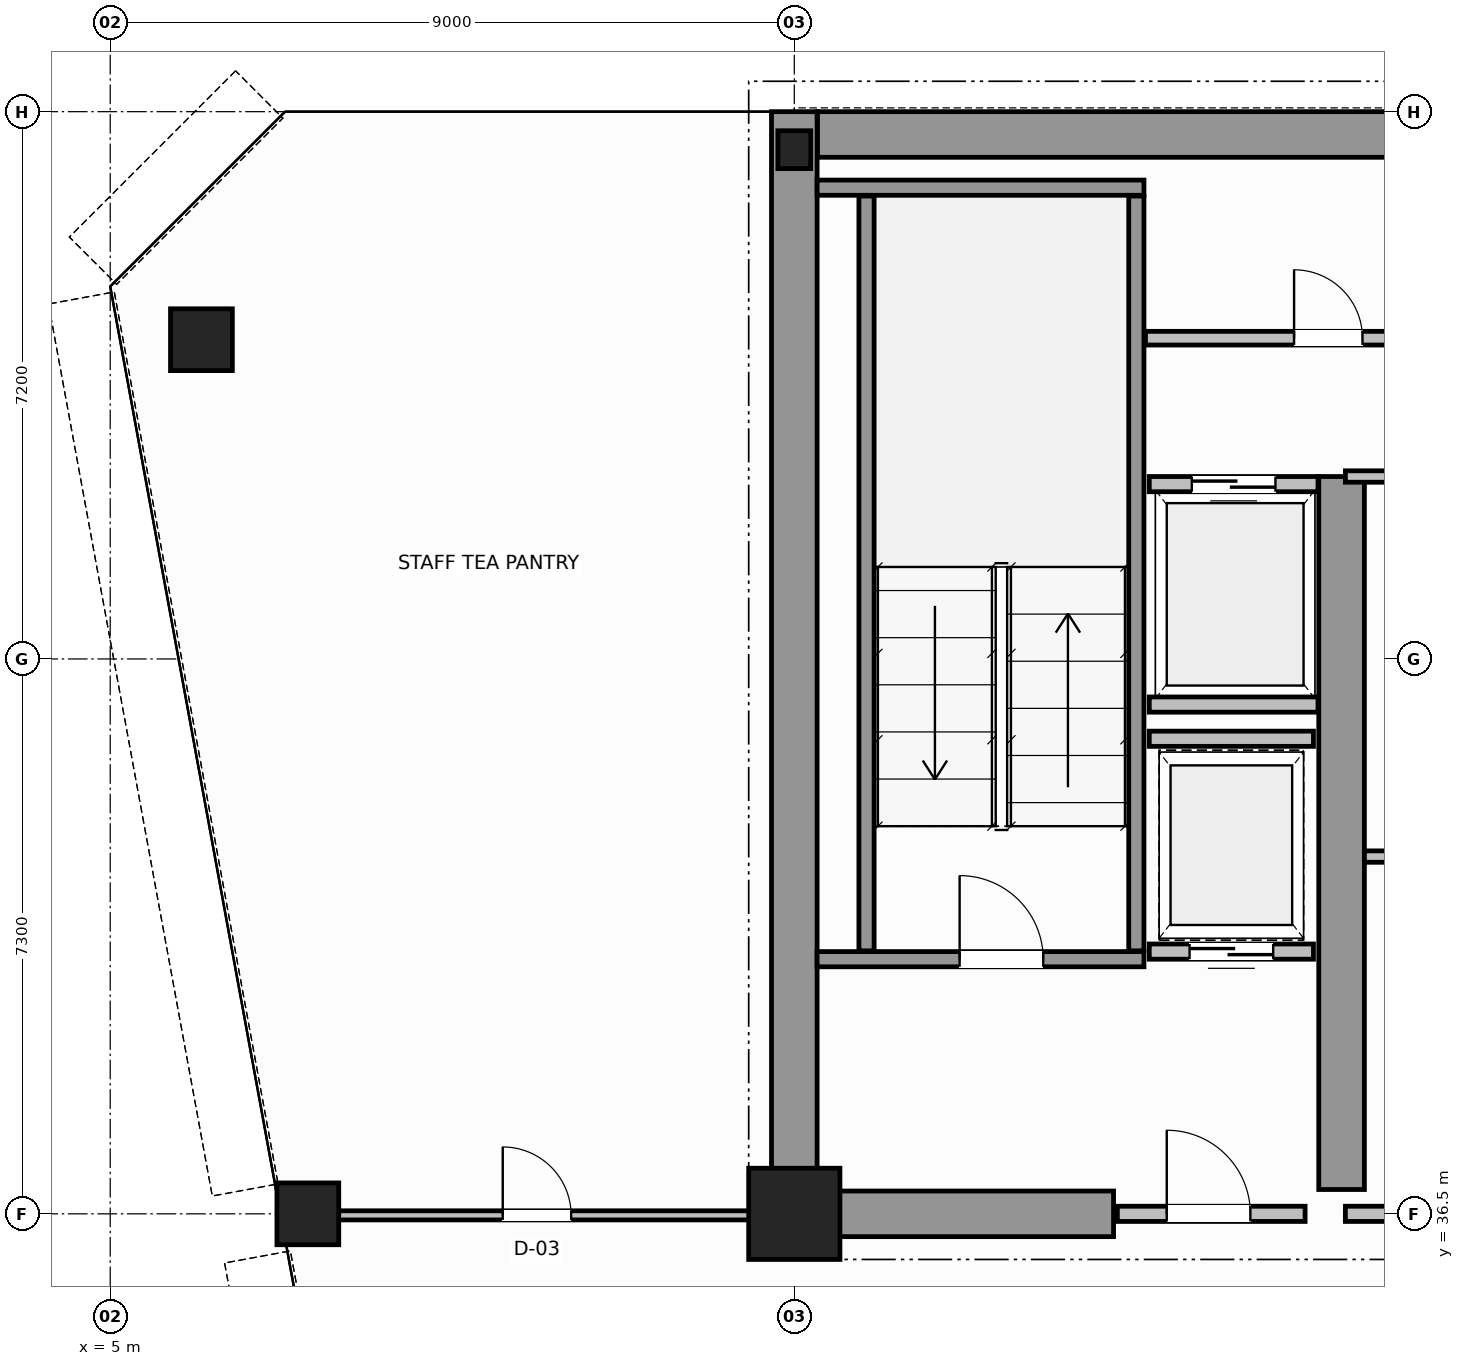
"""IFC4 building model, lengths in metres.
Left out: names, types, materials, properties, quantities, classifications, styles, units other than length and angle.
Written with IfcOpenShell. Run it as: python <this file> out.ifc"""

import sys

from ifc_helpers import new_model, si_unit, direction, frame, frame_2d, origin, origin_2d, place, context, subcontext, project, spatial, rectangle, hollow_circle, i_section, extrude, source, transform, mapped, element, fill, save


model = new_model("IFC4")
c1 = context("Model", 3, precision=1e-05, world=origin(), true_north=direction((0.0, 1.0)))
c2 = subcontext(c1, "Body", "Model", "MODEL_VIEW")
j1 = project(units=[si_unit("LENGTHUNIT", "METRE"), si_unit("PLANEANGLEUNIT", "RADIAN")], contexts=[c1])
p1 = place(None, origin())
s1 = spatial("IfcSite", under=j1, at=p1, CompositionType="ELEMENT")
p2 = place(p1, origin())
s2 = spatial("IfcBuilding", under=s1, at=p2, CompositionType="ELEMENT")
p3 = place(p2, frame((0.0, 0.0, 191.8)))
s3 = spatial("IfcBuildingStorey", under=s2, at=p3, CompositionType="ELEMENT", Elevation=191.8)
m1 = source(origin(), c2, "Body", "SweptSolid", [
    extrude(rectangle(XDim=1.2, YDim=1.2, at=origin_2d()), origin(), (0.0, 0.0, 1.0), 3.8),
])
p4 = place(p3, frame((14.0, 36.5, 0.0), z_axis=(0.0, 0.0, 1.0), x_axis=(1.0, 0.0, 0.0)))
e1 = element("IfcColumn", 1, at=p4, inside=s3, PredefinedType="COLUMN", context=c2, shape_type="MappedRepresentation", body=[
    mapped(m1, transform((0.0, 0.0, 0.0), scale=1.0)),
])
m2 = source(origin(), c2, "Body", "SweptSolid", [
    extrude(i_section(OverallWidth=0.432, OverallDepth=0.498, WebThickness=0.055, FlangeThickness=0.068, FilletRadius=0.015, at=origin_2d()), origin(), (0.0, 0.0, 1.0), 3.8),
])
p5 = place(p3, frame((14.0, 50.5, 0.0), z_axis=(0.0, 0.0, 1.0), x_axis=(1.0, 0.0, 0.0)))
e2 = element("IfcColumn", 2, at=p5, inside=s3, PredefinedType="COLUMN", context=c2, shape_type="MappedRepresentation", body=[
    mapped(m2, transform((0.0, 0.0, 0.0), scale=1.0)),
])
m3 = source(origin(), c2, "Body", "SweptSolid", [
    extrude(hollow_circle(Radius=0.406, WallThickness=0.04, at=origin_2d()), origin(), (0.0, 0.0, 1.0), 3.8),
])
for number, where, z_axis, x_axis in (
    (3, (6.2, 48.0, 0.0), (0.0, 0.0, 1.0), (1.0, 0.0, 0.0)),
    (4, (7.6, 36.5, 0.0), (0.0, 0.0, 1.0), (1.0, 0.0, 0.0)),
):
    element("IfcColumn", number, at=place(p3, frame(where, z_axis=z_axis, x_axis=x_axis)), inside=s3, PredefinedType="COLUMN", context=c2, shape_type="MappedRepresentation", body=[
        mapped(m3, transform((0.0, 0.0, 0.0), scale=1.0)),
    ])
p6 = place(p3, frame((14.304, 50.7, 0.0), z_axis=(0.0, 0.0, 1.0), x_axis=(1.0, 0.0, 0.0)))
e5 = element("IfcWall", 5, at=p6, inside=s3, PredefinedType="SHEAR", context=c2, shape_type="SweptSolid", body=[
    extrude(rectangle(XDim=19.694, YDim=0.6, at=frame_2d((9.847, 0.0))), origin(), (0.0, 0.0, 1.0), 3.8),
])
p7 = place(p3, frame((14.0, 36.5, 0.0), z_axis=(0.0, 0.0, 1.0), x_axis=(0.0, 1.0, 0.0)))
e6 = element("IfcWall", 6, at=p7, inside=s3, PredefinedType="SHEAR", context=c2, shape_type="SweptSolid", body=[
    extrude(rectangle(XDim=14.5, YDim=0.6, at=frame_2d((7.25, 0.0))), origin(), (0.0, 0.0, 1.0), 3.8),
])
p8 = place(p3, frame((14.32, 36.5, 0.0), z_axis=(0.0, 0.0, 1.0), x_axis=(1.0, 0.0, 0.0)))
e7 = element("IfcWall", 7, at=p8, inside=s3, PredefinedType="SHEAR", context=c2, shape_type="SweptSolid", body=[
    extrude(rectangle(XDim=3.88, YDim=0.6, at=frame_2d((1.94, 0.0))), origin(), (0.0, 0.0, 1.0), 2.58),
])
p9 = place(p3, frame((21.2, 36.82, 0.0), z_axis=(0.0, 0.0, 1.0), x_axis=(0.0, 1.0, 0.0)))
e8 = element("IfcWall", 8, at=p9, inside=s3, PredefinedType="SHEAR", context=c2, shape_type="SweptSolid", body=[
    extrude(rectangle(XDim=9.38, YDim=0.6, at=frame_2d((4.69, 0.0))), origin(), (0.0, 0.0, 1.0), 3.8),
])
p10 = place(p3, frame((14.3, 39.85, 0.0), z_axis=(0.0, 0.0, 1.0), x_axis=(1.0, 0.0, 0.0)))
e9 = element("IfcWall", 9, at=p10, inside=s3, PredefinedType="SOLIDWALL", context=c2, shape_type="SweptSolid", body=[
    extrude(rectangle(XDim=4.3, YDim=0.2, at=frame_2d((2.15, 0.0))), origin(), (0.0, 0.0, 1.0), 3.8),
])
p11 = place(p10, frame((1.875, 0.0, 0.0)))
e10 = element("IfcOpeningElement", 10, at=p11, cuts=e9, PredefinedType="OPENING", context=c2, shape_type="SweptSolid", body=[
    extrude(rectangle(XDim=1.1, YDim=2.15, at=frame_2d((0.55, 1.075))), frame((0.0, 0.11, 0.0), z_axis=(0.0, -1.0, 0.0), x_axis=(1.0, 0.0, 0.0)), (0.0, 0.0, 1.0), 0.22),
])
p12 = place(p3, frame((14.3, 50.0, 0.0), z_axis=(0.0, 0.0, 1.0), x_axis=(1.0, 0.0, 0.0)))
e11 = element("IfcWall", 11, at=p12, inside=s3, PredefinedType="SOLIDWALL", context=c2, shape_type="SweptSolid", body=[
    extrude(rectangle(XDim=4.3, YDim=0.2, at=frame_2d((2.15, 0.0))), origin(), (0.0, 0.0, 1.0), 3.8),
])
for number, where, z_axis, x_axis in (
    (12, (14.95, 39.96, 0.0), (0.0, 0.0, 1.0), (0.0, 1.0, 0.0)),
    (13, (18.5, 39.96, 0.0), (0.0, 0.0, 1.0), (0.0, 1.0, 0.0)),
):
    element("IfcWall", number, at=place(p3, frame(where, z_axis=z_axis, x_axis=x_axis)), inside=s3, PredefinedType="SOLIDWALL", context=c2, shape_type="SweptSolid", body=[
        extrude(rectangle(XDim=9.93, YDim=0.2, at=frame_2d((4.965, 0.0))), origin(), (0.0, 0.0, 1.0), 3.8),
    ])
p13 = place(p3, frame((18.25, 36.5, 0.0), z_axis=(0.0, 0.0, 1.0), x_axis=(1.0, 0.0, 0.0)))
e14 = element("IfcWall", 14, at=p13, inside=s3, PredefinedType="SOLIDWALL", context=c2, shape_type="SweptSolid", body=[
    extrude(rectangle(XDim=2.47, YDim=0.2, at=frame_2d((1.235, 0.0))), origin(), (0.0, 0.0, 1.0), 2.57),
])
p14 = place(p13, frame((0.65, 0.0, 0.0)))
e15 = element("IfcOpeningElement", 15, at=p14, cuts=e14, PredefinedType="OPENING", context=c2, shape_type="SweptSolid", body=[
    extrude(rectangle(XDim=1.1, YDim=2.15, at=frame_2d((0.55, 1.075))), frame((0.0, 0.11, 0.0), z_axis=(0.0, -1.0, 0.0), x_axis=(1.0, 0.0, 0.0)), (0.0, 0.0, 1.0), 0.22),
])
p15 = place(p3, frame((18.67, 46.1, 0.0), z_axis=(0.0, 0.0, 1.0), x_axis=(1.0, 0.0, 0.0)))
e16 = element("IfcWall", 16, at=p15, inside=s3, PredefinedType="SOLIDWALL", context=c2, shape_type="SweptSolid", body=[
    extrude(rectangle(XDim=2.22, YDim=0.2, at=frame_2d((1.11, 0.0))), origin(), (0.0, 0.0, 1.0), 3.58),
])
p16 = place(p15, frame((0.56, 0.0, 0.0)))
e17 = element("IfcOpeningElement", 17, at=p16, cuts=e16, PredefinedType="OPENING", context=c2, shape_type="SweptSolid", body=[
    extrude(rectangle(XDim=1.1, YDim=2.15, at=frame_2d((0.55, 1.075))), frame((0.0, 0.11, 0.0), z_axis=(0.0, -1.0, 0.0), x_axis=(1.0, 0.0, 0.0)), (0.0, 0.0, 1.0), 0.22),
])
p17 = place(p3, frame((18.67, 43.2, 0.0), z_axis=(0.0, 0.0, 1.0), x_axis=(1.0, 0.0, 0.0)))
e18 = element("IfcWall", 18, at=p17, inside=s3, PredefinedType="SOLIDWALL", context=c2, shape_type="SweptSolid", body=[
    extrude(rectangle(XDim=2.22, YDim=0.2, at=frame_2d((1.11, 0.0))), origin(), (0.0, 0.0, 1.0), 3.58),
])
p18 = place(p3, frame((18.67, 39.95, 0.0), z_axis=(0.0, 0.0, 1.0), x_axis=(1.0, 0.0, 0.0)))
e19 = element("IfcWall", 19, at=p18, inside=s3, PredefinedType="SOLIDWALL", context=c2, shape_type="SweptSolid", body=[
    extrude(rectangle(XDim=2.16, YDim=0.2, at=frame_2d((1.08, 0.0))), origin(), (0.0, 0.0, 1.0), 3.58),
])
p19 = place(p18, frame((0.53, 0.0, 0.0)))
e20 = element("IfcOpeningElement", 20, at=p19, cuts=e19, PredefinedType="OPENING", context=c2, shape_type="SweptSolid", body=[
    extrude(rectangle(XDim=1.1, YDim=2.15, at=frame_2d((0.55, 1.075))), frame((0.0, 0.11, 0.0), z_axis=(0.0, -1.0, 0.0), x_axis=(1.0, 0.0, 0.0)), (0.0, 0.0, 1.0), 0.22),
])
p20 = place(p3, frame((18.67, 42.75, 0.0), z_axis=(0.0, 0.0, 1.0), x_axis=(1.0, 0.0, 0.0)))
e21 = element("IfcWall", 21, at=p20, inside=s3, PredefinedType="SOLIDWALL", context=c2, shape_type="SweptSolid", body=[
    extrude(rectangle(XDim=2.16, YDim=0.2, at=frame_2d((1.08, 0.0))), origin(), (0.0, 0.0, 1.0), 3.58),
])
p21 = place(p3, frame((21.25, 36.5, 0.0), z_axis=(0.0, 0.0, 1.0), x_axis=(1.0, 0.0, 0.0)))
e22 = element("IfcWall", 22, at=p21, inside=s3, PredefinedType="SOLIDWALL", context=c2, shape_type="SweptSolid", body=[
    extrude(rectangle(XDim=6.27, YDim=0.2, at=frame_2d((3.135, 0.0))), origin(), (0.0, 0.0, 1.0), 2.57),
])
p22 = place(p21, frame((2.6, 0.0, 0.0)))
e23 = element("IfcOpeningElement", 23, at=p22, cuts=e22, PredefinedType="OPENING", context=c2, shape_type="SweptSolid", body=[
    extrude(rectangle(XDim=1.1, YDim=2.15, at=frame_2d((0.55, 1.075))), frame((0.0, 0.11, 0.0), z_axis=(0.0, -1.0, 0.0), x_axis=(1.0, 0.0, 0.0)), (0.0, 0.0, 1.0), 0.22),
])
p23 = place(p3, frame((21.25, 46.2, 0.0), z_axis=(0.0, 0.0, 1.0), x_axis=(1.0, 0.0, 0.0)))
e24 = element("IfcWall", 24, at=p23, inside=s3, PredefinedType="PARTITIONING", context=c2, shape_type="SweptSolid", body=[
    extrude(rectangle(XDim=8.5, YDim=0.15, at=frame_2d((4.25, 0.0))), origin(), (0.0, 0.0, 1.0), 3.58),
])
p24 = place(p3, frame((21.5, 41.2, 0.0), z_axis=(0.0, 0.0, 1.0), x_axis=(1.0, 0.0, 0.0)))
e25 = element("IfcWall", 25, at=p24, inside=s3, PredefinedType="PARTITIONING", context=c2, shape_type="SweptSolid", body=[
    extrude(rectangle(XDim=8.0, YDim=0.15, at=frame_2d((4.0, 0.0))), origin(), (0.0, 0.0, 1.0), 3.58),
])
p25 = place(p24, frame((3.4, 0.0, 0.0)))
e26 = element("IfcOpeningElement", 26, at=p25, cuts=e25, PredefinedType="OPENING", context=c2, shape_type="SweptSolid", body=[
    extrude(rectangle(XDim=0.9, YDim=2.1, at=frame_2d((0.45, 1.05))), frame((0.0, 0.085, 0.0), z_axis=(0.0, -1.0, 0.0), x_axis=(1.0, 0.0, 0.0)), (0.0, 0.0, 1.0), 0.17),
])
p26 = place(p3, frame((18.62, 48.02, 0.0), z_axis=(0.0, 0.0, 1.0), x_axis=(1.0, 0.0, 0.0)))
e27 = element("IfcWall", 27, at=p26, inside=s3, PredefinedType="PLUMBINGWALL", context=c2, shape_type="SweptSolid", body=[
    extrude(rectangle(XDim=30.76, YDim=0.18, at=frame_2d((15.38, 0.0))), origin(), (0.0, 0.0, 1.0), 3.58),
])
p27 = place(p26, frame((1.955, 0.0, 0.0)))
e28 = element("IfcOpeningElement", 28, at=p27, cuts=e27, PredefinedType="OPENING", context=c2, shape_type="SweptSolid", body=[
    extrude(rectangle(XDim=0.9, YDim=2.15, at=frame_2d((0.45, 1.075))), frame((0.0, 0.1, 0.0), z_axis=(0.0, -1.0, 0.0), x_axis=(1.0, 0.0, 0.0)), (0.0, 0.0, 1.0), 0.2),
])
p28 = place(p26, frame((8.03, 0.0, 0.0)))
e29 = element("IfcOpeningElement", 29, at=p28, cuts=e27, PredefinedType="OPENING", context=c2, shape_type="SweptSolid", body=[
    extrude(rectangle(XDim=0.9, YDim=2.15, at=frame_2d((0.45, 1.075))), frame((0.0, 0.1, 0.0), z_axis=(0.0, -1.0, 0.0), x_axis=(1.0, 0.0, 0.0)), (0.0, 0.0, 1.0), 0.2),
])
p29 = place(p26, frame((16.93, 0.0, 0.0)))
e30 = element("IfcOpeningElement", 30, at=p29, cuts=e27, PredefinedType="OPENING", context=c2, shape_type="SweptSolid", body=[
    extrude(rectangle(XDim=0.9, YDim=2.15, at=frame_2d((0.45, 1.075))), frame((0.0, 0.1, 0.0), z_axis=(0.0, -1.0, 0.0), x_axis=(1.0, 0.0, 0.0)), (0.0, 0.0, 1.0), 0.2),
])
p30 = place(p26, frame((26.205, 0.0, 0.0)))
e31 = element("IfcOpeningElement", 31, at=p30, cuts=e27, PredefinedType="OPENING", context=c2, shape_type="SweptSolid", body=[
    extrude(rectangle(XDim=0.9, YDim=2.15, at=frame_2d((0.45, 1.075))), frame((0.0, 0.1, 0.0), z_axis=(0.0, -1.0, 0.0), x_axis=(1.0, 0.0, 0.0)), (0.0, 0.0, 1.0), 0.2),
])
p31 = place(p3, frame((7.289, 36.48, 0.0), z_axis=(0.0, 0.0, 1.0), x_axis=(1.0, 0.0, 0.0)))
e32 = element("IfcWall", 32, at=p31, inside=s3, PredefinedType="PARTITIONING", context=c2, shape_type="SweptSolid", body=[
    extrude(rectangle(XDim=6.651, YDim=0.12, at=frame_2d((3.325, 0.0))), origin(), (0.0, 0.0, 1.0), 2.97),
])
p32 = place(p31, frame((2.875, 0.0, 0.0)))
e33 = element("IfcOpeningElement", 33, at=p32, cuts=e32, PredefinedType="OPENING", context=c2, shape_type="SweptSolid", body=[
    extrude(rectangle(XDim=0.9, YDim=2.15, at=frame_2d((0.45, 1.075))), frame((0.0, 0.07, 0.0), z_axis=(0.0, -1.0, 0.0), x_axis=(1.0, 0.0, 0.0)), (0.0, 0.0, 1.0), 0.14),
])
m4 = source(origin(), c2, "Body", "SweptSolid", [
    extrude(rectangle(XDim=1.1, YDim=2.15, at=frame_2d((0.55, 1.075))), frame((0.0, 0.025, 0.0), z_axis=(0.0, -1.0, 0.0), x_axis=(1.0, 0.0, 0.0)), (0.0, 0.0, 1.0), 0.05),
])
p33 = place(p11, origin())
e34 = element("IfcDoor", 34, at=p33, inside=s3, OperationType="SINGLE_SWING_LEFT", PredefinedType="DOOR", context=c2, shape_type="MappedRepresentation", body=[
    mapped(m4, transform((0.0, 0.0, 0.0), scale=1.0)),
])
fill(e10, e34)
p34 = place(p14, origin())
e35 = element("IfcDoor", 35, at=p34, inside=s3, OperationType="SINGLE_SWING_RIGHT", PredefinedType="DOOR", context=c2, shape_type="MappedRepresentation", body=[
    mapped(m4, transform((0.0, 0.0, 0.0), scale=1.0)),
])
fill(e15, e35)
p35 = place(p16, origin())
e36 = element("IfcDoor", 36, at=p35, inside=s3, OperationType="DOUBLE_DOOR_SLIDING", PredefinedType="DOOR", context=c2, shape_type="MappedRepresentation", body=[
    mapped(m4, transform((0.0, 0.0, 0.0), scale=1.0)),
])
fill(e17, e36)
p36 = place(p19, origin())
e37 = element("IfcDoor", 37, at=p36, inside=s3, OperationType="DOUBLE_DOOR_SLIDING", PredefinedType="DOOR", context=c2, shape_type="MappedRepresentation", body=[
    mapped(m4, transform((0.0, 0.0, 0.0), scale=1.0)),
])
fill(e20, e37)
m5 = source(origin(), c2, "Body", "SweptSolid", [
    extrude(rectangle(XDim=0.9, YDim=2.15, at=frame_2d((0.45, 1.075))), frame((0.0, 0.025, 0.0), z_axis=(0.0, -1.0, 0.0), x_axis=(1.0, 0.0, 0.0)), (0.0, 0.0, 1.0), 0.05),
])
p37 = place(p27, origin())
e38 = element("IfcDoor", 38, at=p37, inside=s3, OperationType="SINGLE_SWING_LEFT", PredefinedType="DOOR", context=c2, shape_type="MappedRepresentation", body=[
    mapped(m5, transform((0.0, 0.0, 0.0), scale=1.0)),
])
fill(e28, e38)
p38 = place(p32, origin())
e39 = element("IfcDoor", 39, at=p38, inside=s3, OperationType="SINGLE_SWING_LEFT", PredefinedType="DOOR", context=c2, shape_type="MappedRepresentation", body=[
    mapped(m5, transform((0.0, 0.0, 0.0), scale=1.0)),
])
fill(e33, e39)
save(model, sys.argv[1])
